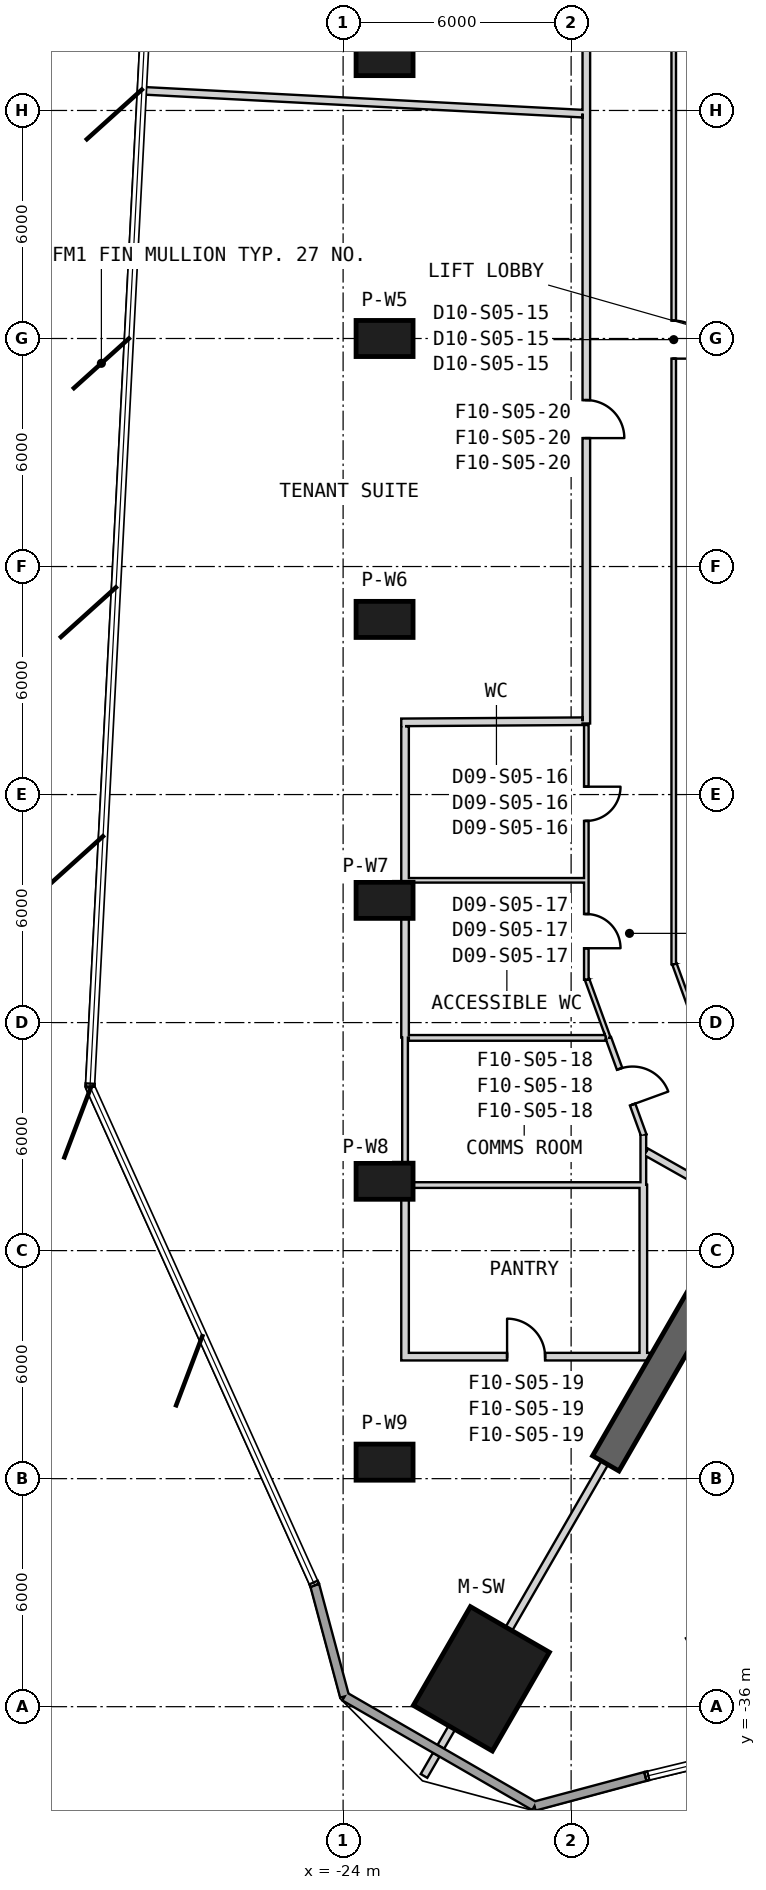
"""IFC4 building model, lengths in metres.
Left out: names, types, materials, properties, quantities, classifications, styles, units other than length and angle.
Written with IfcOpenShell. Run it as: python <this file> out.ifc"""

import sys

from ifc_helpers import new_model, si_unit, direction, frame, frame_2d, origin, origin_2d, place, context, subcontext, project, spatial, rectangle, extrude, element, fill, save


model = new_model("IFC4")
c1 = context("Model", 3, precision=1e-05, world=origin(), true_north=direction((0.0, 1.0)))
c2 = subcontext(c1, "Body", "Model", "MODEL_VIEW")
j1 = project(units=[si_unit("LENGTHUNIT", "METRE"), si_unit("PLANEANGLEUNIT", "RADIAN")], contexts=[c1])
p1 = place(None, origin())
s1 = spatial("IfcSite", under=j1, at=p1, CompositionType="ELEMENT")
p2 = place(p1, origin())
s2 = spatial("IfcBuilding", under=s1, at=p2, CompositionType="ELEMENT")
p3 = place(p2, frame((0.0, 0.0, 107.0)))
s3 = spatial("IfcBuildingStorey", under=s2, at=p3, CompositionType="ELEMENT", Elevation=107.0)
p4 = place(p3, frame((-20.362, -35.267, 0.0), z_axis=(0.0, 0.0, 1.0), x_axis=(-0.5, -0.866025403784, 0.0)))
e1 = element("IfcColumn", 1, at=p4, inside=s3, PredefinedType="COLUMN", context=c2, shape_type="SweptSolid", body=[
    extrude(rectangle(XDim=3.0, YDim=2.4, at=origin_2d()), origin(), (0.0, 0.0, 1.0), 4.1),
])
for number, where, z_axis, x_axis in (
    (2, (-22.909, 7.391, 0.0), (0.0, 0.0, 1.0), (-1.0, 0.0, 0.0)),
    (3, (-22.909, 0.0, 0.0), (0.0, 0.0, 1.0), (-1.0, 0.0, 0.0)),
    (4, (-22.909, -7.391, 0.0), (0.0, 0.0, 1.0), (-1.0, 0.0, 0.0)),
    (5, (-22.909, -14.783, 0.0), (0.0, 0.0, 1.0), (-1.0, 0.0, 0.0)),
    (6, (-22.909, -22.174, 0.0), (0.0, 0.0, 1.0), (-1.0, 0.0, 0.0)),
    (7, (-22.909, -29.566, 0.0), (0.0, 0.0, 1.0), (-1.0, 0.0, 0.0)),
):
    element("IfcColumn", number, at=place(p3, frame(where, z_axis=z_axis, x_axis=x_axis)), inside=s3, PredefinedType="COLUMN", context=c2, shape_type="SweptSolid", body=[
        extrude(rectangle(XDim=1.5, YDim=0.95, at=origin_2d()), origin(), (0.0, 0.0, 1.0), 4.1),
    ])
p5 = place(p3, frame((-10.575, -18.316, 0.0), z_axis=(0.0, 0.0, 1.0), x_axis=(-0.500003112169, -0.866023606965, 0.0)))
e8 = element("IfcWall", 8, at=p5, inside=s3, PredefinedType="SHEAR", context=c2, shape_type="SweptSolid", body=[
    extrude(rectangle(XDim=13.027, YDim=0.8, at=frame_2d((6.513, 0.0))), origin(), (0.0, 0.0, 1.0), 4.1),
])
p6 = place(p5, frame((1.3, 0.0, 0.0)))
e9 = element("IfcOpeningElement", 9, at=p6, cuts=e8, PredefinedType="OPENING", context=c2, shape_type="SweptSolid", body=[
    extrude(rectangle(XDim=1.4, YDim=2.4, at=frame_2d((0.7, 1.2))), frame((0.0, 0.41, 0.0), z_axis=(0.0, -1.0, 0.0), x_axis=(1.0, 0.0, 0.0)), (0.0, 0.0, 1.0), 0.82),
])
p7 = place(p3, frame((-24.746, -32.806, 0.0), z_axis=(0.0, 0.0, 1.0), x_axis=(0.258811290087, -0.965927904206, 0.0)))
e10 = element("IfcWall", 10, at=p7, inside=s3, PredefinedType="SOLIDWALL", context=c2, shape_type="SweptSolid", body=[
    extrude(rectangle(XDim=3.029, YDim=0.24, at=frame_2d((1.515, 0.0))), origin(), (0.0, 0.0, 1.0), 3.8),
])
p8 = place(p3, frame((-23.962, -35.732, 0.0), z_axis=(0.0, 0.0, 1.0), x_axis=(0.866013679419, -0.500020306647, 0.0)))
e11 = element("IfcWall", 11, at=p8, inside=s3, PredefinedType="SOLIDWALL", context=c2, shape_type="SweptSolid", body=[
    extrude(rectangle(XDim=5.771, YDim=0.24, at=frame_2d((2.885, 0.0))), origin(), (0.0, 0.0, 1.0), 3.8),
])
p9 = place(p3, frame((-18.964, -38.617, 0.0), z_axis=(0.0, 0.0, 1.0), x_axis=(0.965936508551, 0.258779175065, 0.0)))
e12 = element("IfcWall", 12, at=p9, inside=s3, PredefinedType="SOLIDWALL", context=c2, shape_type="SweptSolid", body=[
    extrude(rectangle(XDim=3.021, YDim=0.24, at=frame_2d((1.51, 0.0))), origin(), (0.0, 0.0, 1.0), 3.8),
])
p10 = place(p3, frame((-15.3, 16.345, 0.0), z_axis=(0.0, 0.0, 1.0), x_axis=(0.0, -1.0, 0.0)))
e13 = element("IfcWall", 13, at=p10, inside=s3, PredefinedType="PARTITIONING", context=c2, shape_type="SweptSolid", body=[
    extrude(rectangle(XDim=32.811, YDim=0.12, at=frame_2d((16.405, 0.0))), origin(), (0.0, 0.0, 1.0), 2.98),
])
p11 = place(p10, frame((15.875, 0.0, 0.0)))
e14 = element("IfcOpeningElement", 14, at=p11, cuts=e13, PredefinedType="OPENING", context=c2, shape_type="SweptSolid", body=[
    extrude(rectangle(XDim=1.0, YDim=2.1, at=frame_2d((0.5, 1.05))), frame((0.0, 0.07, 0.0), z_axis=(0.0, -1.0, 0.0), x_axis=(1.0, 0.0, 0.0)), (0.0, 0.0, 1.0), 0.14),
])
p12 = place(p3, frame((-15.28, -16.462, 0.0), z_axis=(0.0, 0.0, 1.0), x_axis=(0.34206888523, -0.939674878752, 0.0)))
e15 = element("IfcWall", 15, at=p12, inside=s3, PredefinedType="PARTITIONING", context=c2, shape_type="SweptSolid", body=[
    extrude(rectangle(XDim=3.73, YDim=0.12, at=frame_2d((1.865, 0.0))), origin(), (0.0, 0.0, 1.0), 2.88),
])
p13 = place(p3, frame((-17.6, 16.911, 0.0), z_axis=(0.0, 0.0, 1.0), x_axis=(0.0, -1.0, 0.0)))
e16 = element("IfcWall", 16, at=p13, inside=s3, PredefinedType="PARTITIONING", context=c2, shape_type="SweptSolid", body=[
    extrude(rectangle(XDim=11.022, YDim=0.2, at=frame_2d((5.511, 0.0))), origin(), (0.0, 0.0, 1.0), 2.98),
])
p14 = place(p13, frame((5.05, 0.0, 0.0)))
e17 = element("IfcOpeningElement", 17, at=p14, cuts=e16, PredefinedType="OPENING", context=c2, shape_type="SweptSolid", body=[
    extrude(rectangle(XDim=1.0, YDim=2.1, at=frame_2d((0.5, 1.05))), frame((0.0, 0.11, 0.0), z_axis=(0.0, -1.0, 0.0), x_axis=(1.0, 0.0, 0.0)), (0.0, 0.0, 1.0), 0.22),
])
p15 = place(p3, frame((-17.6, 5.888, 0.0), z_axis=(0.0, 0.0, 1.0), x_axis=(0.0, -1.0, 0.0)))
e18 = element("IfcWall", 18, at=p15, inside=s3, PredefinedType="PARTITIONING", context=c2, shape_type="SweptSolid", body=[
    extrude(rectangle(XDim=16.018, YDim=0.2, at=frame_2d((8.009, 0.0))), origin(), (0.0, 0.0, 1.0), 3.08),
])
p16 = place(p15, frame((7.509, 0.0, 0.0)))
e19 = element("IfcOpeningElement", 19, at=p16, cuts=e18, PredefinedType="OPENING", context=c2, shape_type="SweptSolid", body=[
    extrude(rectangle(XDim=1.0, YDim=2.1, at=frame_2d((0.5, 1.05))), frame((0.0, 0.11, 0.0), z_axis=(0.0, -1.0, 0.0), x_axis=(1.0, 0.0, 0.0)), (0.0, 0.0, 1.0), 0.22),
])
p17 = place(p3, frame((-16.025, -21.403, 0.0), z_axis=(0.0, 0.0, 1.0), x_axis=(0.870940841338, -0.491387882318, 0.0)))
e20 = element("IfcWall", 20, at=p17, inside=s3, PredefinedType="PARTITIONING", context=c2, shape_type="SweptSolid", body=[
    extrude(rectangle(XDim=2.777, YDim=0.2, at=frame_2d((1.388, 0.0))), origin(), (0.0, 0.0, 1.0), 3.8),
])
p18 = place(p3, frame((-17.6, -10.17, 0.0), z_axis=(0.0, 0.0, 1.0), x_axis=(0.0, -1.0, 0.0)))
e21 = element("IfcWall", 21, at=p18, inside=s3, PredefinedType="PARTITIONING", context=c2, shape_type="SweptSolid", body=[
    extrude(rectangle(XDim=6.701, YDim=0.12, at=frame_2d((3.351, 0.0))), origin(), (0.0, 0.0, 1.0), 2.98),
])
p19 = place(p18, frame((1.623, 0.0, 0.0)))
e22 = element("IfcOpeningElement", 22, at=p19, cuts=e21, PredefinedType="OPENING", context=c2, shape_type="SweptSolid", body=[
    extrude(rectangle(XDim=0.9, YDim=2.1, at=frame_2d((0.45, 1.05))), frame((0.0, 0.07, 0.0), z_axis=(0.0, -1.0, 0.0), x_axis=(1.0, 0.0, 0.0)), (0.0, 0.0, 1.0), 0.14),
])
p20 = place(p18, frame((4.974, 0.0, 0.0)))
e23 = element("IfcOpeningElement", 23, at=p20, cuts=e21, PredefinedType="OPENING", context=c2, shape_type="SweptSolid", body=[
    extrude(rectangle(XDim=0.9, YDim=2.1, at=frame_2d((0.45, 1.05))), frame((0.0, 0.07, 0.0), z_axis=(0.0, -1.0, 0.0), x_axis=(1.0, 0.0, 0.0)), (0.0, 0.0, 1.0), 0.14),
])
p21 = place(p3, frame((-17.58, -16.867, 0.0), z_axis=(0.0, 0.0, 1.0), x_axis=(0.342113754223, -0.939658543925, 0.0)))
e24 = element("IfcWall", 24, at=p21, inside=s3, PredefinedType="PARTITIONING", context=c2, shape_type="SweptSolid", body=[
    extrude(rectangle(XDim=1.639, YDim=0.12, at=frame_2d((0.82, 0.0))), origin(), (0.0, 0.0, 1.0), 2.98),
])
p22 = place(p3, frame((-17.019, -18.407, 0.0), z_axis=(0.0, 0.0, 1.0), x_axis=(0.341987834354, -0.939704379661, 0.0)))
e25 = element("IfcWall", 25, at=p22, inside=s3, PredefinedType="PLUMBINGWALL", context=c2, shape_type="SweptSolid", body=[
    extrude(rectangle(XDim=2.723, YDim=0.15, at=frame_2d((1.361, 0.0))), origin(), (0.0, 0.0, 1.0), 2.88),
])
p23 = place(p22, frame((0.862, 0.0, 0.0)))
e26 = element("IfcOpeningElement", 26, at=p23, cuts=e25, PredefinedType="OPENING", context=c2, shape_type="SweptSolid", body=[
    extrude(rectangle(XDim=1.0, YDim=2.1, at=frame_2d((0.5, 1.05))), frame((0.0, 0.085, 0.0), z_axis=(0.0, -1.0, 0.0), x_axis=(1.0, 0.0, 0.0)), (0.0, 0.0, 1.0), 0.17),
])
p24 = place(p3, frame((-17.7, 5.916, 0.0), z_axis=(0.0, 0.0, 1.0), x_axis=(-0.998647121722, 0.051999291111, 0.0)))
e27 = element("IfcWall", 27, at=p24, inside=s3, PredefinedType="PARTITIONING", context=c2, shape_type="SweptSolid", body=[
    extrude(rectangle(XDim=11.611, YDim=0.2, at=frame_2d((5.805, 0.0))), origin(), (0.0, 0.0, 1.0), 3.08),
])
p25 = place(p3, frame((-17.114, -29.583, 0.0), z_axis=(0.0, 0.0, 1.0), x_axis=(-0.499994660107, -0.866028486751, 0.0)))
e28 = element("IfcWall", 28, at=p25, inside=s3, PredefinedType="PARTITIONING", context=c2, shape_type="SweptSolid", body=[
    extrude(rectangle(XDim=5.046, YDim=0.2, at=frame_2d((2.523, 0.0))), origin(), (0.0, 0.0, 1.0), 3.37),
])
p26 = place(p3, frame((-21.137, -36.551, 0.0), z_axis=(0.0, 0.0, 1.0), x_axis=(-0.500193841991, -0.86591346013, 0.0)))
e29 = element("IfcWall", 29, at=p26, inside=s3, PredefinedType="PARTITIONING", context=c2, shape_type="SweptSolid", body=[
    extrude(rectangle(XDim=0.583, YDim=0.2, at=frame_2d((0.292, 0.0))), origin(), (0.0, 0.0, 1.0), 3.8),
])
p27 = place(p3, frame((-21.549, -37.264, 0.0), z_axis=(0.0, 0.0, 1.0), x_axis=(-0.500006411147, -0.866021702275, 0.0)))
e30 = element("IfcWall", 30, at=p27, inside=s3, PredefinedType="PARTITIONING", context=c2, shape_type="SweptSolid", body=[
    extrude(rectangle(XDim=0.645, YDim=0.2, at=frame_2d((0.323, 0.0))), origin(), (0.0, 0.0, 1.0), 3.8),
])
p28 = place(p3, frame((-17.7, -10.071, 0.0), z_axis=(0.0, 0.0, 1.0), x_axis=(-0.999980184405, -0.006295299554, 0.0)))
e31 = element("IfcWall", 31, at=p28, inside=s3, PredefinedType="PARTITIONING", context=c2, shape_type="SweptSolid", body=[
    extrude(rectangle(XDim=4.77, YDim=0.2, at=frame_2d((2.385, 0.0))), origin(), (0.0, 0.0, 1.0), 3.8),
])
p29 = place(p3, frame((-22.37, -26.89, 0.0), z_axis=(0.0, 0.0, 1.0), x_axis=(0.0, 1.0, 0.0)))
e32 = element("IfcWall", 32, at=p29, inside=s3, PredefinedType="PARTITIONING", context=c2, shape_type="SweptSolid", body=[
    extrude(rectangle(XDim=4.622, YDim=0.2, at=frame_2d((2.311, 0.0))), origin(), (0.0, 0.0, 1.0), 3.8),
])
p30 = place(p3, frame((-22.37, -18.396, 0.0), z_axis=(0.0, 0.0, 1.0), x_axis=(0.0, 1.0, 0.0)))
e33 = element("IfcWall", 33, at=p30, inside=s3, PredefinedType="PARTITIONING", context=c2, shape_type="SweptSolid", body=[
    extrude(rectangle(XDim=8.196, YDim=0.2, at=frame_2d((4.098, 0.0))), origin(), (0.0, 0.0, 1.0), 3.08),
])
p31 = place(p3, frame((-22.37, -22.268, 0.0), z_axis=(0.0, 0.0, 1.0), x_axis=(0.0, 1.0, 0.0)))
e34 = element("IfcWall", 34, at=p31, inside=s3, PredefinedType="PLUMBINGWALL", context=c2, shape_type="SweptSolid", body=[
    extrude(rectangle(XDim=3.872, YDim=0.15, at=frame_2d((1.936, 0.0))), origin(), (0.0, 0.0, 1.0), 2.98),
])
p32 = place(p3, frame((-16.1, -22.268, 0.0), z_axis=(0.0, 0.0, 1.0), x_axis=(0.0, 1.0, 0.0)))
e35 = element("IfcWall", 35, at=p32, inside=s3, PredefinedType="PLUMBINGWALL", context=c2, shape_type="SweptSolid", body=[
    extrude(rectangle(XDim=1.32, YDim=0.15, at=frame_2d((0.66, 0.0))), origin(), (0.0, 0.0, 1.0), 2.88),
])
p33 = place(p3, frame((-22.27, -26.79, 0.0), z_axis=(0.0, 0.0, 1.0), x_axis=(1.0, 0.0, 0.0)))
e36 = element("IfcWall", 36, at=p33, inside=s3, PredefinedType="PARTITIONING", context=c2, shape_type="SweptSolid", body=[
    extrude(rectangle(XDim=6.341, YDim=0.2, at=frame_2d((3.17, 0.0))), origin(), (0.0, 0.0, 1.0), 2.88),
])
p34 = place(p33, frame((2.585, 0.0, 0.0)))
e37 = element("IfcOpeningElement", 37, at=p34, cuts=e36, PredefinedType="OPENING", context=c2, shape_type="SweptSolid", body=[
    extrude(rectangle(XDim=1.0, YDim=2.1, at=frame_2d((0.5, 1.05))), frame((0.0, 0.11, 0.0), z_axis=(0.0, -1.0, 0.0), x_axis=(1.0, 0.0, 0.0)), (0.0, 0.0, 1.0), 0.22),
])
p35 = place(p3, frame((-16.1, -26.69, 0.0), z_axis=(0.0, 0.0, 1.0), x_axis=(0.0, 1.0, 0.0)))
e38 = element("IfcWall", 38, at=p35, inside=s3, PredefinedType="PARTITIONING", context=c2, shape_type="SweptSolid", body=[
    extrude(rectangle(XDim=4.422, YDim=0.2, at=frame_2d((2.211, 0.0))), origin(), (0.0, 0.0, 1.0), 3.8),
])
p36 = place(p3, frame((-17.66, -14.256, 0.0), z_axis=(0.0, 0.0, 1.0), x_axis=(-1.0, 0.0, 0.0)))
e39 = element("IfcWall", 39, at=p36, inside=s3, PredefinedType="PARTITIONING", context=c2, shape_type="SweptSolid", body=[
    extrude(rectangle(XDim=4.61, YDim=0.12, at=frame_2d((2.305, 0.0))), origin(), (0.0, 0.0, 1.0), 3.08),
])
p37 = place(p3, frame((-17.084, -18.403, 0.0), z_axis=(0.0, 0.0, 1.0), x_axis=(-1.0, 0.0, 0.0)))
e40 = element("IfcWall", 40, at=p37, inside=s3, PredefinedType="PLUMBINGWALL", context=c2, shape_type="SweptSolid", body=[
    extrude(rectangle(XDim=5.186, YDim=0.15, at=frame_2d((2.593, 0.0))), origin(), (0.0, 0.0, 1.0), 2.98),
])
p38 = place(p3, frame((-16.175, -22.275, 0.0), z_axis=(0.0, 0.0, 1.0), x_axis=(-1.0, 0.0, 0.0)))
e41 = element("IfcWall", 41, at=p38, inside=s3, PredefinedType="PLUMBINGWALL", context=c2, shape_type="SweptSolid", body=[
    extrude(rectangle(XDim=6.12, YDim=0.15, at=frame_2d((3.06, 0.0))), origin(), (0.0, 0.0, 1.0), 2.88),
])
p39 = place(p11, origin())
e42 = element("IfcDoor", 42, at=p39, inside=s3, OperationType="SINGLE_SWING_LEFT", PredefinedType="NOTDEFINED", context=c2, shape_type="SweptSolid", body=[
    extrude(rectangle(XDim=1.0, YDim=2.1, at=frame_2d((0.5, 1.05))), frame((0.0, 0.025, 0.0), z_axis=(0.0, -1.0, 0.0), x_axis=(1.0, 0.0, 0.0)), (0.0, 0.0, 1.0), 0.05),
])
fill(e14, e42)
p40 = place(p19, origin())
e43 = element("IfcDoor", 43, at=p40, inside=s3, OperationType="SINGLE_SWING_RIGHT", PredefinedType="NOTDEFINED", context=c2, shape_type="SweptSolid", body=[
    extrude(rectangle(XDim=0.9, YDim=2.1, at=frame_2d((0.45, 1.05))), frame((0.0, 0.025, 0.0), z_axis=(0.0, -1.0, 0.0), x_axis=(1.0, 0.0, 0.0)), (0.0, 0.0, 1.0), 0.05),
])
fill(e22, e43)
p41 = place(p20, origin())
e44 = element("IfcDoor", 44, at=p41, inside=s3, OperationType="SINGLE_SWING_LEFT", PredefinedType="NOTDEFINED", context=c2, shape_type="SweptSolid", body=[
    extrude(rectangle(XDim=0.9, YDim=2.1, at=frame_2d((0.45, 1.05))), frame((0.0, 0.025, 0.0), z_axis=(0.0, -1.0, 0.0), x_axis=(1.0, 0.0, 0.0)), (0.0, 0.0, 1.0), 0.05),
])
fill(e23, e44)
p42 = place(p23, origin())
e45 = element("IfcDoor", 45, at=p42, inside=s3, OperationType="SINGLE_SWING_LEFT", PredefinedType="USERDEFINED", context=c2, shape_type="SweptSolid", body=[
    extrude(rectangle(XDim=1.0, YDim=2.1, at=frame_2d((0.5, 1.05))), frame((0.0, 0.025, 0.0), z_axis=(0.0, -1.0, 0.0), x_axis=(1.0, 0.0, 0.0)), (0.0, 0.0, 1.0), 0.05),
])
fill(e26, e45)
p43 = place(p34, origin())
e46 = element("IfcDoor", 46, at=p43, inside=s3, OperationType="SINGLE_SWING_RIGHT", PredefinedType="USERDEFINED", context=c2, shape_type="SweptSolid", body=[
    extrude(rectangle(XDim=1.0, YDim=2.1, at=frame_2d((0.5, 1.05))), frame((0.0, 0.025, 0.0), z_axis=(0.0, -1.0, 0.0), x_axis=(1.0, 0.0, 0.0)), (0.0, 0.0, 1.0), 0.05),
])
fill(e37, e46)
p44 = place(p16, origin())
e47 = element("IfcDoor", 47, at=p44, inside=s3, OperationType="SINGLE_SWING_RIGHT", PredefinedType="USERDEFINED", context=c2, shape_type="SweptSolid", body=[
    extrude(rectangle(XDim=1.0, YDim=2.1, at=frame_2d((0.5, 1.05))), frame((0.0, 0.025, 0.0), z_axis=(0.0, -1.0, 0.0), x_axis=(1.0, 0.0, 0.0)), (0.0, 0.0, 1.0), 0.05),
])
fill(e19, e47)
save(model, sys.argv[1])
